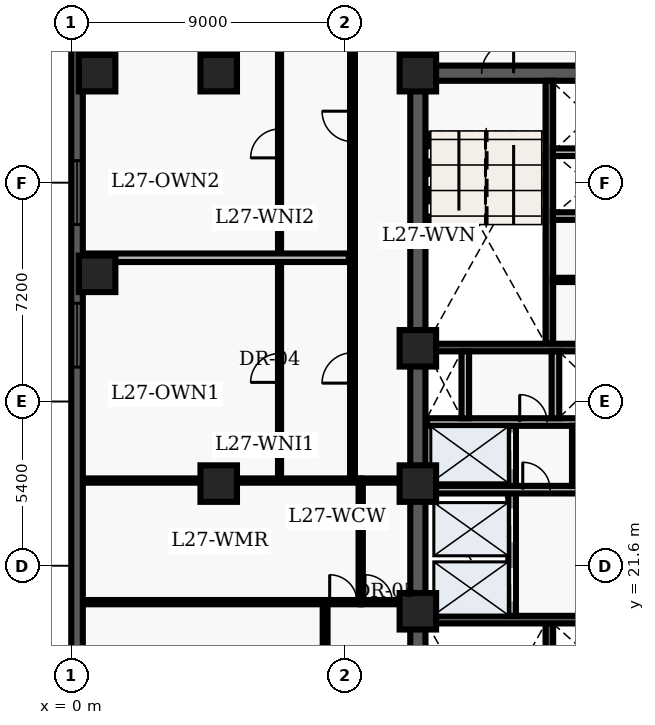
"""IFC4 building model, lengths in metres.
Left out: names, types, materials, properties, quantities, classifications, styles, units other than length and angle.
Written with IfcOpenShell. Run it as: python <this file> out.ifc"""

import sys

from ifc_helpers import new_model, entity, si_unit, converted_unit, direction, frame, origin_with_axes, origin_2d_with_axis, place, context, subcontext, project, spatial, polyline, rectangle, outline, extrude, element, fill, save


model = new_model("IFC4")
c1 = context("Model", 3, precision=1e-05, world=origin_with_axes(), true_north=direction((0.0, 1.0)))
c2 = subcontext(c1, "Body", "Model", "MODEL_VIEW")
j1 = project(units=[si_unit("LENGTHUNIT", "METRE"), converted_unit("PLANEANGLEUNIT", "DEGREE", entity("IfcPlaneAngleMeasure", 0.017), si_unit("PLANEANGLEUNIT", "RADIAN"), dimensions=[0, 0, 0, 0, 0, 0, 0])], contexts=[c1])
p1 = place(None, origin_with_axes())
s1 = spatial("IfcSite", under=j1, at=p1, CompositionType="ELEMENT")
p2 = place(p1, origin_with_axes())
s2 = spatial("IfcBuilding", under=s1, at=p2, CompositionType="ELEMENT")
p3 = place(p2, frame((0.0, 0.0, 112.5), z_axis=(0.0, 0.0, 1.0), x_axis=(1.0, 0.0, 0.0)))
s3 = spatial("IfcBuildingStorey", under=s2, at=p3, CompositionType="ELEMENT", Elevation=112.5)
p4 = place(p3, frame((11.4, 10.8, 0.0), z_axis=(0.0, 0.0, 1.0), x_axis=(0.0, 1.0, 0.0)))
e1 = element("IfcWall", 1, at=p4, inside=s3, PredefinedType="SHEAR", context=c2, shape_type="SweptSolid", body=[
    extrude(outline(polyline([(0.0, -0.25), (27.0, -0.25), (27.0, 0.25), (0.0, 0.25), (0.0, -0.25)])), origin_with_axes(), (0.0, 0.0, 1.0), 3.66),
])
p5 = place(p3, frame((11.4, 37.8, 0.0), z_axis=(0.0, 0.0, 1.0), x_axis=(1.0, 0.0, 0.0)))
e2 = element("IfcWall", 2, at=p5, inside=s3, PredefinedType="SHEAR", context=c2, shape_type="SweptSolid", body=[
    extrude(outline(polyline([(0.0, -0.25), (7.2, -0.25), (7.2, 0.25), (0.0, 0.25), (0.0, -0.25)])), origin_with_axes(), (0.0, 0.0, 1.0), 3.66),
])
p6 = place(p5, frame((2.625, 0.0, 0.0), z_axis=(0.0, 0.0, 1.0), x_axis=(1.0, 0.0, 0.0)))
e3 = element("IfcOpeningElement", 3, at=p6, cuts=e2, PredefinedType="OPENING", context=c2, shape_type="SweptSolid", body=[
    extrude(rectangle(XDim=1.05, YDim=0.52, at=origin_2d_with_axis()), origin_with_axes(), (0.0, 0.0, 1.0), 2.15),
])
p7 = place(p3, frame((15.725, 11.05, 0.0), z_axis=(0.0, 0.0, 1.0), x_axis=(0.0, 1.0, 0.0)))
e4 = element("IfcWall", 4, at=p7, inside=s3, PredefinedType="SHEAR", context=c2, shape_type="SweptSolid", body=[
    extrude(outline(polyline([(0.0, -0.125), (8.65, -0.125), (8.65, 0.125), (0.0, 0.125), (0.0, -0.125)])), origin_with_axes(), (0.0, 0.0, 1.0), 3.66),
])
p8 = place(p3, frame((11.65, 19.825, 0.0), z_axis=(0.0, 0.0, 1.0), x_axis=(1.0, 0.0, 0.0)))
e5 = element("IfcWall", 5, at=p8, inside=s3, PredefinedType="SHEAR", context=c2, shape_type="SweptSolid", body=[
    extrude(outline(polyline([(0.0, -0.125), (6.7, -0.125), (6.7, 0.125), (0.0, 0.125), (0.0, -0.125)])), origin_with_axes(), (0.0, 0.0, 1.0), 3.66),
])
p9 = place(p3, frame((15.725, 28.9, 0.0), z_axis=(0.0, 0.0, 1.0), x_axis=(0.0, 1.0, 0.0)))
e6 = element("IfcWall", 6, at=p9, inside=s3, PredefinedType="SHEAR", context=c2, shape_type="SweptSolid", body=[
    extrude(outline(polyline([(0.0, -0.125), (8.65, -0.125), (8.65, 0.125), (0.0, 0.125), (0.0, -0.125)])), origin_with_axes(), (0.0, 0.0, 1.0), 3.66),
])
p10 = place(p3, frame((11.65, 28.775, 0.0), z_axis=(0.0, 0.0, 1.0), x_axis=(1.0, 0.0, 0.0)))
e7 = element("IfcWall", 7, at=p10, inside=s3, PredefinedType="SHEAR", context=c2, shape_type="SweptSolid", body=[
    extrude(outline(polyline([(0.0, -0.125), (6.7, -0.125), (6.7, 0.125), (0.0, 0.125), (0.0, -0.125)])), origin_with_axes(), (0.0, 0.0, 1.0), 3.66),
])
p11 = place(p3, frame((14.5, 19.95, 0.0), z_axis=(0.0, 0.0, 1.0), x_axis=(0.0, 1.0, 0.0)))
e8 = element("IfcWall", 8, at=p11, inside=s3, PredefinedType="SOLIDWALL", context=c2, shape_type="SweptSolid", body=[
    extrude(outline(polyline([(0.0, -0.125), (6.25, -0.125), (6.25, 0.125), (0.0, 0.125), (0.0, -0.125)])), origin_with_axes(), (0.0, 0.0, 1.0), 2.7),
])
p12 = place(p11, frame((1.025, 0.0, 0.0), z_axis=(0.0, 0.0, 1.0), x_axis=(1.0, 0.0, 0.0)))
e9 = element("IfcOpeningElement", 9, at=p12, cuts=e8, PredefinedType="OPENING", context=c2, shape_type="SweptSolid", body=[
    extrude(rectangle(XDim=1.1, YDim=0.27, at=origin_2d_with_axis()), origin_with_axes(), (0.0, 0.0, 1.0), 2.15),
])
p13 = place(p11, frame((2.975, 0.0, 0.0), z_axis=(0.0, 0.0, 1.0), x_axis=(1.0, 0.0, 0.0)))
e10 = element("IfcOpeningElement", 10, at=p13, cuts=e8, PredefinedType="OPENING", context=c2, shape_type="SweptSolid", body=[
    extrude(rectangle(XDim=1.1, YDim=0.27, at=origin_2d_with_axis()), origin_with_axes(), (0.0, 0.0, 1.0), 2.15),
])
p14 = place(p11, frame((5.425, 0.0, 0.0), z_axis=(0.0, 0.0, 1.0), x_axis=(1.0, 0.0, 0.0)))
e11 = element("IfcOpeningElement", 11, at=p14, cuts=e8, PredefinedType="OPENING", context=c2, shape_type="SweptSolid", body=[
    extrude(rectangle(XDim=1.2, YDim=0.27, at=origin_2d_with_axis()), origin_with_axes(), (0.0, 0.0, 1.0), 2.15),
])
p15 = place(p3, frame((11.7, 24.1, 0.0), z_axis=(0.0, 0.0, 1.0), x_axis=(1.0, 0.0, 0.0)))
e12 = element("IfcWall", 12, at=p15, inside=s3, PredefinedType="SOLIDWALL", context=c2, shape_type="SweptSolid", body=[
    extrude(outline(polyline([(0.0, -0.125), (6.6, -0.125), (6.6, 0.125), (0.0, 0.125), (0.0, -0.125)])), origin_with_axes(), (0.0, 0.0, 1.0), 2.7),
])
p16 = place(p15, frame((3.6, 0.0, 0.0), z_axis=(0.0, 0.0, 1.0), x_axis=(1.0, 0.0, 0.0)))
e13 = element("IfcOpeningElement", 13, at=p16, cuts=e12, PredefinedType="OPENING", context=c2, shape_type="SweptSolid", body=[
    extrude(rectangle(XDim=0.9, YDim=0.27, at=origin_2d_with_axis()), origin_with_axes(), (0.0, 0.0, 1.0), 2.15),
])
p17 = place(p15, frame((5.65, 0.0, 0.0), z_axis=(0.0, 0.0, 1.0), x_axis=(1.0, 0.0, 0.0)))
e14 = element("IfcOpeningElement", 14, at=p17, cuts=e12, PredefinedType="OPENING", context=c2, shape_type="SweptSolid", body=[
    extrude(rectangle(XDim=0.9, YDim=0.27, at=origin_2d_with_axis()), origin_with_axes(), (0.0, 0.0, 1.0), 2.15),
])
p18 = place(p3, frame((11.7, 26.325, 0.0), z_axis=(0.0, 0.0, 1.0), x_axis=(1.0, 0.0, 0.0)))
e15 = element("IfcWall", 15, at=p18, inside=s3, PredefinedType="SOLIDWALL", context=c2, shape_type="SweptSolid", body=[
    extrude(outline(polyline([(0.0, -0.125), (6.6, -0.125), (6.6, 0.125), (0.0, 0.125), (0.0, -0.125)])), origin_with_axes(), (0.0, 0.0, 1.0), 2.7),
])
p19 = place(p18, frame((3.5, 0.0, 0.0), z_axis=(0.0, 0.0, 1.0), x_axis=(1.0, 0.0, 0.0)))
e16 = element("IfcOpeningElement", 16, at=p19, cuts=e15, PredefinedType="OPENING", context=c2, shape_type="SweptSolid", body=[
    extrude(rectangle(XDim=0.9, YDim=0.27, at=origin_2d_with_axis()), origin_with_axes(), (0.0, 0.0, 1.0), 2.15),
])
for number, where, z_axis, x_axis in (
    (17, (12.96, 26.45, 0.0), (0.0, 0.0, 1.0), (0.0, 1.0, 0.0)),
    (18, (15.925, 26.45, 0.0), (0.0, 0.0, 1.0), (0.0, 1.0, 0.0)),
):
    element("IfcWall", number, at=place(p3, frame(where, z_axis=z_axis, x_axis=x_axis)), inside=s3, PredefinedType="SOLIDWALL", context=c2, shape_type="SweptSolid", body=[
        extrude(outline(polyline([(0.0, -0.125), (2.2, -0.125), (2.2, 0.125), (0.0, 0.125), (0.0, -0.125)])), origin_with_axes(), (0.0, 0.0, 1.0), 2.7),
    ])
for number, where, z_axis, x_axis in (
    (19, (11.4, 20.1, 0.0), (0.0, 0.0, 1.0), (1.0, 0.0, 0.0)),
    (20, (11.4, 24.3, 0.0), (0.0, 0.0, 1.0), (1.0, 0.0, 0.0)),
    (21, (11.4, 28.75, 0.0), (0.0, 0.0, 1.0), (1.0, 0.0, 0.0)),
    (22, (11.4, 37.8, 0.0), (0.0, 0.0, 1.0), (1.0, 0.0, 0.0)),
    (23, (4.85, 24.3, 0.0), (0.0, 0.0, 1.0), (1.0, 0.0, 0.0)),
    (24, (4.85, 37.8, 0.0), (0.0, 0.0, 1.0), (1.0, 0.0, 0.0)),
    (25, (0.85, 31.2, 0.0), (0.0, 0.0, 1.0), (1.0, 0.0, 0.0)),
    (26, (0.85, 37.8, 0.0), (0.0, 0.0, 1.0), (1.0, 0.0, 0.0)),
):
    element("IfcColumn", number, at=place(p3, frame(where, z_axis=z_axis, x_axis=x_axis)), inside=s3, PredefinedType="COLUMN", context=c2, shape_type="SweptSolid", body=[
        extrude(rectangle(XDim=1.2, YDim=1.2, at=origin_2d_with_axis()), origin_with_axes(), (0.0, 0.0, 1.0), 3.9),
    ])
p20 = place(p3, frame((16.55, 24.22, 0.0), z_axis=(0.0, 0.0, 1.0), x_axis=(0.0, 1.0, 0.0)))
e27 = element("IfcWall", 27, at=p20, inside=s3, PredefinedType="PARTITIONING", context=c2, shape_type="SweptSolid", body=[
    extrude(outline(polyline([(0.0, -0.08), (1.98, -0.08), (1.98, 0.08), (0.0, 0.08), (0.0, -0.08)])), origin_with_axes(), (0.0, 0.0, 1.0), 2.7),
])
for number, where, z_axis, x_axis in (
    (28, (15.84, 33.1, 0.0), (0.0, 0.0, 1.0), (1.0, 0.0, 0.0)),
    (29, (15.84, 35.2, 0.0), (0.0, 0.0, 1.0), (1.0, 0.0, 0.0)),
):
    element("IfcWall", number, at=place(p3, frame(where, z_axis=z_axis, x_axis=x_axis)), inside=s3, PredefinedType="SOLIDWALL", context=c2, shape_type="SweptSolid", body=[
        extrude(outline(polyline([(0.0, -0.125), (2.46, -0.125), (2.46, 0.125), (0.0, 0.125), (0.0, -0.125)])), origin_with_axes(), (0.0, 0.0, 1.0), 2.7),
    ])
p21 = place(p3, frame((15.84, 31.0, 0.0), z_axis=(0.0, 0.0, 1.0), x_axis=(1.0, 0.0, 0.0)))
e30 = element("IfcWall", 30, at=p21, inside=s3, PredefinedType="PARTITIONING", context=c2, shape_type="SweptSolid", body=[
    extrude(outline(polyline([(0.0, -0.07), (2.46, -0.07), (2.46, 0.07), (0.0, 0.07), (0.0, -0.07)])), origin_with_axes(), (0.0, 0.0, 1.0), 2.7),
])
p22 = place(p3, frame((9.52, 20.4, 0.0), z_axis=(0.0, 0.0, 1.0), x_axis=(0.0, 1.0, 0.0)))
e31 = element("IfcWall", 31, at=p22, inside=s3, PredefinedType="PARTITIONING", context=c2, shape_type="SweptSolid", body=[
    extrude(outline(polyline([(0.0, -0.07), (4.0, -0.07), (4.0, 0.07), (0.0, 0.07), (0.0, -0.07)])), origin_with_axes(), (0.0, 0.0, 1.0), 2.7),
])
p23 = place(p3, frame((9.52, 20.4, 0.0), z_axis=(0.0, 0.0, 1.0), x_axis=(1.0, 0.0, 0.0)))
e32 = element("IfcWall", 32, at=p23, inside=s3, PredefinedType="PARTITIONING", context=c2, shape_type="SweptSolid", body=[
    extrude(outline(polyline([(0.0, -0.07), (1.58, -0.07), (1.58, 0.07), (0.0, 0.07), (0.0, -0.07)])), origin_with_axes(), (0.0, 0.0, 1.0), 2.7),
])
p24 = place(p23, frame((0.59, 0.0, 0.0), z_axis=(0.0, 0.0, 1.0), x_axis=(1.0, 0.0, 0.0)))
e33 = element("IfcOpeningElement", 33, at=p24, cuts=e32, PredefinedType="OPENING", context=c2, shape_type="SweptSolid", body=[
    extrude(rectangle(XDim=0.9, YDim=0.16, at=origin_2d_with_axis()), origin_with_axes(), (0.0, 0.0, 1.0), 2.15),
])
p25 = place(p3, frame((9.52, 24.4, 0.0), z_axis=(0.0, 0.0, 1.0), x_axis=(1.0, 0.0, 0.0)))
e34 = element("IfcWall", 34, at=p25, inside=s3, PredefinedType="PARTITIONING", context=c2, shape_type="SweptSolid", body=[
    extrude(outline(polyline([(0.0, -0.07), (1.58, -0.07), (1.58, 0.07), (0.0, 0.07), (0.0, -0.07)])), origin_with_axes(), (0.0, 0.0, 1.0), 2.7),
])
p26 = place(p3, frame((8.35, 7.8, 0.0), z_axis=(0.0, 0.0, 1.0), x_axis=(0.0, 1.0, 0.0)))
e35 = element("IfcWall", 35, at=p26, inside=s3, PredefinedType="PARTITIONING", context=c2, shape_type="SweptSolid", body=[
    extrude(outline(polyline([(0.0, -0.08), (12.6, -0.08), (12.6, 0.08), (0.0, 0.08), (0.0, -0.08)])), origin_with_axes(), (0.0, 0.0, 1.0), 2.7),
])
p27 = place(p26, frame((6.325, 0.0, 0.0), z_axis=(0.0, 0.0, 1.0), x_axis=(1.0, 0.0, 0.0)))
e36 = element("IfcOpeningElement", 36, at=p27, cuts=e35, PredefinedType="OPENING", context=c2, shape_type="SweptSolid", body=[
    extrude(rectangle(XDim=1.0, YDim=0.18, at=origin_2d_with_axis()), origin_with_axes(), (0.0, 0.0, 1.0), 2.15),
])
p28 = place(p3, frame((9.25, 24.4, 0.0), z_axis=(0.0, 0.0, 1.0), x_axis=(0.0, 1.0, 0.0)))
e37 = element("IfcWall", 37, at=p28, inside=s3, PredefinedType="PARTITIONING", context=c2, shape_type="SweptSolid", body=[
    extrude(outline(polyline([(0.0, -0.08), (16.1, -0.08), (16.1, 0.08), (0.0, 0.08), (0.0, -0.08)])), origin_with_axes(), (0.0, 0.0, 1.0), 2.7),
])
p29 = place(p28, frame((3.704, 0.0, 0.0), z_axis=(0.0, 0.0, 1.0), x_axis=(1.0, 0.0, 0.0)))
e38 = element("IfcOpeningElement", 38, at=p29, cuts=e37, PredefinedType="OPENING", context=c2, shape_type="SweptSolid", body=[
    extrude(rectangle(XDim=1.0, YDim=0.18, at=origin_2d_with_axis()), origin_with_axes(), (0.0, 0.0, 1.0), 2.15),
])
p30 = place(p28, frame((11.649, 0.0, 0.0), z_axis=(0.0, 0.0, 1.0), x_axis=(1.0, 0.0, 0.0)))
e39 = element("IfcOpeningElement", 39, at=p30, cuts=e37, PredefinedType="OPENING", context=c2, shape_type="SweptSolid", body=[
    extrude(rectangle(XDim=1.0, YDim=0.18, at=origin_2d_with_axis()), origin_with_axes(), (0.0, 0.0, 1.0), 2.15),
])
p31 = place(p3, frame((0.36, 20.4, 0.0), z_axis=(0.0, 0.0, 1.0), x_axis=(1.0, 0.0, 0.0)))
e40 = element("IfcWall", 40, at=p31, inside=s3, PredefinedType="PARTITIONING", context=c2, shape_type="SweptSolid", body=[
    extrude(outline(polyline([(0.0, -0.07), (9.16, -0.07), (9.16, 0.07), (0.0, 0.07), (0.0, -0.07)])), origin_with_axes(), (0.0, 0.0, 1.0), 2.7),
])
p32 = place(p31, frame((8.59, 0.0, 0.0), z_axis=(0.0, 0.0, 1.0), x_axis=(1.0, 0.0, 0.0)))
e41 = element("IfcOpeningElement", 41, at=p32, cuts=e40, PredefinedType="OPENING", context=c2, shape_type="SweptSolid", body=[
    extrude(rectangle(XDim=0.9, YDim=0.16, at=origin_2d_with_axis()), origin_with_axes(), (0.0, 0.0, 1.0), 2.15),
])
p33 = place(p3, frame((0.36, 24.4, 0.0), z_axis=(0.0, 0.0, 1.0), x_axis=(1.0, 0.0, 0.0)))
e42 = element("IfcWall", 42, at=p33, inside=s3, PredefinedType="PARTITIONING", context=c2, shape_type="SweptSolid", body=[
    extrude(outline(polyline([(0.0, -0.07), (9.16, -0.07), (9.16, 0.07), (0.0, 0.07), (0.0, -0.07)])), origin_with_axes(), (0.0, 0.0, 1.0), 2.7),
])
p34 = place(p3, frame((6.85, 24.55, 0.0), z_axis=(0.0, 0.0, 1.0), x_axis=(0.0, 1.0, 0.0)))
e43 = element("IfcWall", 43, at=p34, inside=s3, PredefinedType="PARTITIONING", context=c2, shape_type="SweptSolid", body=[
    extrude(outline(polyline([(0.0, -0.05), (15.75, -0.05), (15.75, 0.05), (0.0, 0.05), (0.0, -0.05)])), origin_with_axes(), (0.0, 0.0, 1.0), 2.7),
])
p35 = place(p34, frame((3.554, 0.0, 0.0), z_axis=(0.0, 0.0, 1.0), x_axis=(1.0, 0.0, 0.0)))
e44 = element("IfcOpeningElement", 44, at=p35, cuts=e43, PredefinedType="OPENING", context=c2, shape_type="SweptSolid", body=[
    extrude(rectangle(XDim=0.95, YDim=0.12, at=origin_2d_with_axis()), origin_with_axes(), (0.0, 0.0, 1.0), 2.15),
])
p36 = place(p34, frame((10.939, 0.0, 0.0), z_axis=(0.0, 0.0, 1.0), x_axis=(1.0, 0.0, 0.0)))
e45 = element("IfcOpeningElement", 45, at=p36, cuts=e43, PredefinedType="OPENING", context=c2, shape_type="SweptSolid", body=[
    extrude(rectangle(XDim=0.95, YDim=0.12, at=origin_2d_with_axis()), origin_with_axes(), (0.0, 0.0, 1.0), 2.15),
])
p37 = place(p3, frame((0.375, 31.729, 0.0), z_axis=(0.0, 0.0, 1.0), x_axis=(1.0, 0.0, 0.0)))
e46 = element("IfcWall", 46, at=p37, inside=s3, PredefinedType="PARTITIONING", context=c2, shape_type="SweptSolid", body=[
    extrude(outline(polyline([(0.0, -0.14), (8.755, -0.14), (8.755, 0.14), (0.0, 0.14), (0.0, -0.14)])), origin_with_axes(), (0.0, 0.0, 1.0), 2.7),
])
p38 = place(p3, frame((0.19, 2.78, 0.0), z_axis=(0.0, 0.0, 1.0), x_axis=(0.0, 1.0, 0.0)))
e47 = element("IfcWall", 47, at=p38, inside=s3, PredefinedType="SOLIDWALL", context=c2, shape_type="SweptSolid", body=[
    extrude(outline(polyline([(0.0, -0.19), (43.42, -0.19), (43.42, 0.19), (0.0, 0.19), (0.0, -0.19)])), origin_with_axes(), (0.0, 0.0, 1.0), 3.66),
])
p39 = place(p38, frame((2.946, 0.0, 0.45), z_axis=(0.0, 0.0, 1.0), x_axis=(1.0, 0.0, 0.0)))
e48 = element("IfcOpeningElement", 48, at=p39, cuts=e47, PredefinedType="OPENING", context=c2, shape_type="SweptSolid", body=[
    extrude(rectangle(XDim=2.1, YDim=0.4, at=origin_2d_with_axis()), origin_with_axes(), (0.0, 0.0, 1.0), 2.2),
])
p40 = place(p38, frame((12.328, 0.0, 0.45), z_axis=(0.0, 0.0, 1.0), x_axis=(1.0, 0.0, 0.0)))
e49 = element("IfcOpeningElement", 49, at=p40, cuts=e47, PredefinedType="OPENING", context=c2, shape_type="SweptSolid", body=[
    extrude(rectangle(XDim=2.1, YDim=0.4, at=origin_2d_with_axis()), origin_with_axes(), (0.0, 0.0, 1.0), 2.2),
])
p41 = place(p38, frame((26.401, 0.0, 0.45), z_axis=(0.0, 0.0, 1.0), x_axis=(1.0, 0.0, 0.0)))
e50 = element("IfcOpeningElement", 50, at=p41, cuts=e47, PredefinedType="OPENING", context=c2, shape_type="SweptSolid", body=[
    extrude(rectangle(XDim=2.1, YDim=0.4, at=origin_2d_with_axis()), origin_with_axes(), (0.0, 0.0, 1.0), 2.2),
])
p42 = place(p38, frame((31.092, 0.0, 0.45), z_axis=(0.0, 0.0, 1.0), x_axis=(1.0, 0.0, 0.0)))
e51 = element("IfcOpeningElement", 51, at=p42, cuts=e47, PredefinedType="OPENING", context=c2, shape_type="SweptSolid", body=[
    extrude(rectangle(XDim=2.1, YDim=0.4, at=origin_2d_with_axis()), origin_with_axes(), (0.0, 0.0, 1.0), 2.2),
])
p43 = place(p38, frame((40.024, 0.0, 0.45), z_axis=(0.0, 0.0, 1.0), x_axis=(1.0, 0.0, 0.0)))
e52 = element("IfcOpeningElement", 52, at=p43, cuts=e47, PredefinedType="OPENING", context=c2, shape_type="SweptSolid", body=[
    extrude(rectangle(XDim=2.1, YDim=0.4, at=origin_2d_with_axis()), origin_with_axes(), (0.0, 0.0, 1.0), 2.2),
])
p44 = place(p11, frame((1.025, 0.0, 0.0), z_axis=(0.0, 0.0, 1.0), x_axis=(1.0, 0.0, 0.0)))
e53 = element("IfcDoor", 53, at=p44, inside=s3, OperationType="SLIDING_TO_LEFT", PredefinedType="DOOR", context=c2, shape_type="SweptSolid", body=[
    extrude(rectangle(XDim=1.1, YDim=0.09, at=origin_2d_with_axis()), origin_with_axes(), (0.0, 0.0, 1.0), 2.15),
])
fill(e9, e53)
p45 = place(p11, frame((2.975, 0.0, 0.0), z_axis=(0.0, 0.0, 1.0), x_axis=(1.0, 0.0, 0.0)))
e54 = element("IfcDoor", 54, at=p45, inside=s3, OperationType="SLIDING_TO_RIGHT", PredefinedType="DOOR", context=c2, shape_type="SweptSolid", body=[
    extrude(rectangle(XDim=1.1, YDim=0.09, at=origin_2d_with_axis()), origin_with_axes(), (0.0, 0.0, 1.0), 2.15),
])
fill(e10, e54)
p46 = place(p11, frame((5.425, 0.0, 0.0), z_axis=(0.0, 0.0, 1.0), x_axis=(1.0, 0.0, 0.0)))
e55 = element("IfcDoor", 55, at=p46, inside=s3, OperationType="DOUBLE_DOOR_SLIDING", PredefinedType="DOOR", context=c2, shape_type="SweptSolid", body=[
    extrude(rectangle(XDim=1.2, YDim=0.09, at=origin_2d_with_axis()), origin_with_axes(), (0.0, 0.0, 1.0), 2.15),
])
fill(e11, e55)
p47 = place(p5, frame((2.625, 0.0, 0.0), z_axis=(0.0, 0.0, 1.0), x_axis=(1.0, 0.0, 0.0)))
e56 = element("IfcDoor", 56, at=p47, inside=s3, OperationType="SINGLE_SWING_RIGHT", PredefinedType="DOOR", context=c2, shape_type="SweptSolid", body=[
    extrude(rectangle(XDim=1.05, YDim=0.09, at=origin_2d_with_axis()), origin_with_axes(), (0.0, 0.0, 1.0), 2.15),
])
fill(e3, e56)
p48 = place(p15, frame((3.6, 0.0, 0.0), z_axis=(0.0, 0.0, 1.0), x_axis=(1.0, 0.0, 0.0)))
e57 = element("IfcDoor", 57, at=p48, inside=s3, OperationType="SINGLE_SWING_LEFT", PredefinedType="DOOR", context=c2, shape_type="SweptSolid", body=[
    extrude(rectangle(XDim=0.9, YDim=0.09, at=origin_2d_with_axis()), origin_with_axes(), (0.0, 0.0, 1.0), 2.15),
])
fill(e13, e57)
p49 = place(p18, frame((3.5, 0.0, 0.0), z_axis=(0.0, 0.0, 1.0), x_axis=(1.0, 0.0, 0.0)))
e58 = element("IfcDoor", 58, at=p49, inside=s3, OperationType="SINGLE_SWING_LEFT", PredefinedType="DOOR", context=c2, shape_type="SweptSolid", body=[
    extrude(rectangle(XDim=0.9, YDim=0.09, at=origin_2d_with_axis()), origin_with_axes(), (0.0, 0.0, 1.0), 2.15),
])
fill(e16, e58)
p50 = place(p23, frame((0.59, 0.0, 0.0), z_axis=(0.0, 0.0, 1.0), x_axis=(1.0, 0.0, 0.0)))
e59 = element("IfcDoor", 59, at=p50, inside=s3, OperationType="SINGLE_SWING_LEFT", PredefinedType="DOOR", context=c2, shape_type="SweptSolid", body=[
    extrude(rectangle(XDim=0.9, YDim=0.084, at=origin_2d_with_axis()), origin_with_axes(), (0.0, 0.0, 1.0), 2.15),
])
fill(e33, e59)
p51 = place(p31, frame((8.59, 0.0, 0.0), z_axis=(0.0, 0.0, 1.0), x_axis=(1.0, 0.0, 0.0)))
e60 = element("IfcDoor", 60, at=p51, inside=s3, OperationType="SINGLE_SWING_LEFT", PredefinedType="DOOR", context=c2, shape_type="SweptSolid", body=[
    extrude(rectangle(XDim=0.9, YDim=0.084, at=origin_2d_with_axis()), origin_with_axes(), (0.0, 0.0, 1.0), 2.15),
])
fill(e41, e60)
p52 = place(p34, frame((3.554, 0.0, 0.0), z_axis=(0.0, 0.0, 1.0), x_axis=(1.0, 0.0, 0.0)))
e61 = element("IfcDoor", 61, at=p52, inside=s3, OperationType="SINGLE_SWING_LEFT", PredefinedType="DOOR", context=c2, shape_type="SweptSolid", body=[
    extrude(rectangle(XDim=0.95, YDim=0.06, at=origin_2d_with_axis()), origin_with_axes(), (0.0, 0.0, 1.0), 2.15),
])
fill(e44, e61)
p53 = place(p28, frame((3.704, 0.0, 0.0), z_axis=(0.0, 0.0, 1.0), x_axis=(1.0, 0.0, 0.0)))
e62 = element("IfcDoor", 62, at=p53, inside=s3, OperationType="SINGLE_SWING_LEFT", PredefinedType="DOOR", context=c2, shape_type="SweptSolid", body=[
    extrude(rectangle(XDim=1.0, YDim=0.09, at=origin_2d_with_axis()), origin_with_axes(), (0.0, 0.0, 1.0), 2.15),
])
fill(e38, e62)
p54 = place(p34, frame((10.939, 0.0, 0.0), z_axis=(0.0, 0.0, 1.0), x_axis=(1.0, 0.0, 0.0)))
e63 = element("IfcDoor", 63, at=p54, inside=s3, OperationType="SINGLE_SWING_LEFT", PredefinedType="DOOR", context=c2, shape_type="SweptSolid", body=[
    extrude(rectangle(XDim=0.95, YDim=0.06, at=origin_2d_with_axis()), origin_with_axes(), (0.0, 0.0, 1.0), 2.15),
])
fill(e45, e63)
p55 = place(p28, frame((11.649, 0.0, 0.0), z_axis=(0.0, 0.0, 1.0), x_axis=(1.0, 0.0, 0.0)))
e64 = element("IfcDoor", 64, at=p55, inside=s3, OperationType="SINGLE_SWING_RIGHT", PredefinedType="DOOR", context=c2, shape_type="SweptSolid", body=[
    extrude(rectangle(XDim=1.0, YDim=0.09, at=origin_2d_with_axis()), origin_with_axes(), (0.0, 0.0, 1.0), 2.15),
])
fill(e39, e64)
p56 = place(p38, frame((26.401, 0.0, 0.45), z_axis=(0.0, 0.0, 1.0), x_axis=(1.0, 0.0, 0.0)))
e65 = element("IfcWindow", 65, at=p56, inside=s3, PredefinedType="WINDOW", context=c2, shape_type="SweptSolid", body=[
    extrude(rectangle(XDim=2.1, YDim=0.09, at=origin_2d_with_axis()), origin_with_axes(), (0.0, 0.0, 1.0), 2.2),
])
fill(e50, e65)
p57 = place(p38, frame((31.092, 0.0, 0.45), z_axis=(0.0, 0.0, 1.0), x_axis=(1.0, 0.0, 0.0)))
e66 = element("IfcWindow", 66, at=p57, inside=s3, PredefinedType="WINDOW", context=c2, shape_type="SweptSolid", body=[
    extrude(rectangle(XDim=2.1, YDim=0.09, at=origin_2d_with_axis()), origin_with_axes(), (0.0, 0.0, 1.0), 2.2),
])
fill(e51, e66)
save(model, sys.argv[1])
